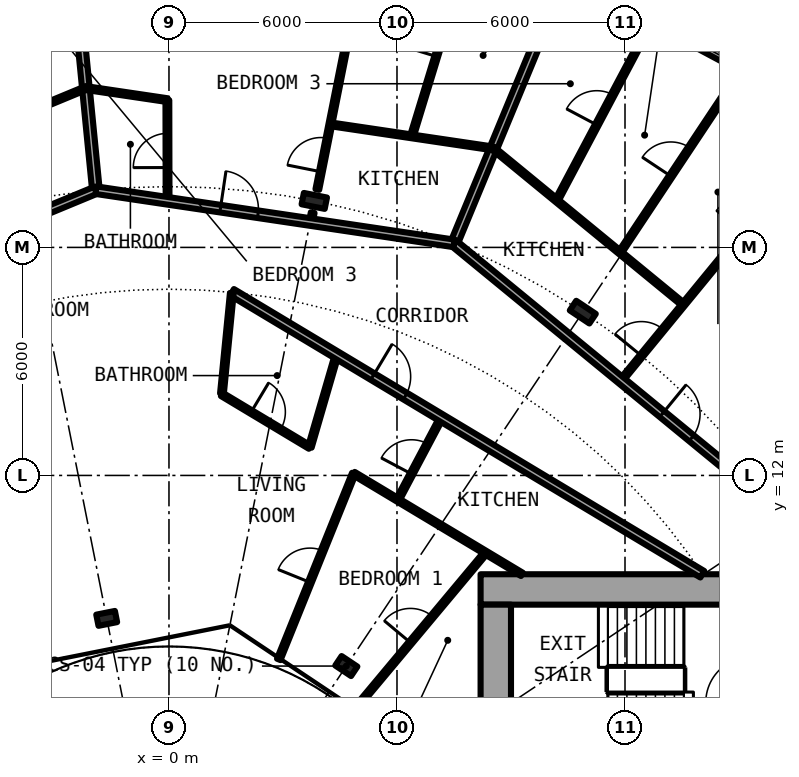
"""IFC4 building model, lengths in metres.
Left out: names, types, materials, properties, quantities, classifications, styles, units other than length and angle.
Written with IfcOpenShell. Run it as: python <this file> out.ifc"""

import sys

from ifc_helpers import new_model, si_unit, direction, frame, frame_2d, origin, origin_2d, place, context, subcontext, project, spatial, rectangle, i_section, extrude, element, fill, save


model = new_model("IFC4")
c1 = context("Model", 3, precision=1e-05, world=origin(), true_north=direction((0.0, 1.0)))
c2 = subcontext(c1, "Body", "Model", "MODEL_VIEW")
j1 = project(units=[si_unit("LENGTHUNIT", "METRE"), si_unit("PLANEANGLEUNIT", "RADIAN")], contexts=[c1])
p1 = place(None, origin())
s1 = spatial("IfcSite", under=j1, at=p1, CompositionType="ELEMENT")
p2 = place(p1, origin())
s2 = spatial("IfcBuilding", under=s1, at=p2, CompositionType="ELEMENT")
p3 = place(p2, frame((0.0, 0.0, 47.2)))
s3 = spatial("IfcBuildingStorey", under=s2, at=p3, CompositionType="ELEMENT", Elevation=47.2)
for number, where, z_axis, x_axis in (
    (1, (10.889, 16.297, 0.0), (0.0, 0.0, 1.0), (0.556, 0.831, 0.0)),
    (2, (3.824, 19.223, 0.0), (0.0, 0.0, 1.0), (0.195, 0.981, 0.0)),
):
    element("IfcColumn", number, at=place(p3, frame(where, z_axis=z_axis, x_axis=x_axis)), inside=s3, PredefinedType="COLUMN", context=c2, shape_type="SweptSolid", body=[
        extrude(i_section(OverallWidth=0.305, OverallDepth=0.62, WebThickness=0.021, FlangeThickness=0.04, FilletRadius=0.027, at=origin_2d()), origin(), (0.0, 0.0, 1.0), 3.05),
    ])
for number, where, z_axis, x_axis in (
    (3, (4.667, 6.984, 0.0), (0.0, 0.0, 1.0), (0.556, 0.831, 0.0)),
    (4, (-1.639, 8.239, 0.0), (0.0, 0.0, 1.0), (-0.195, 0.981, 0.0)),
):
    element("IfcColumn", number, at=place(p3, frame(where, z_axis=z_axis, x_axis=x_axis)), inside=s3, PredefinedType="COLUMN", context=c2, shape_type="SweptSolid", body=[
        extrude(i_section(OverallWidth=0.3, OverallDepth=0.5, WebThickness=0.014, FlangeThickness=0.028, FilletRadius=0.027, at=origin_2d()), origin(), (0.0, 0.0, 1.0), 3.05),
    ])
p4 = place(p3, frame((15.167, 22.699, 0.0), z_axis=(0.0, 0.0, 1.0), x_axis=(-0.881915646801, 0.471407246368, 0.0)))
e5 = element("IfcWall", 5, at=p4, inside=s3, PredefinedType="SOLIDWALL", context=c2, shape_type="SweptSolid", body=[
    extrude(rectangle(XDim=5.352, YDim=0.25, at=frame_2d((2.676, 0.0))), origin(), (0.0, 0.0, 1.0), 2.7),
])
p5 = place(p4, frame((0.441, 0.0, 0.3)))
e6 = element("IfcOpeningElement", 6, at=p5, cuts=e5, PredefinedType="OPENING", context=c2, shape_type="SweptSolid", body=[
    extrude(rectangle(XDim=1.8, YDim=2.1, at=frame_2d((0.9, 1.05))), frame((0.0, 0.135, 0.0), z_axis=(0.0, -1.0, 0.0), x_axis=(1.0, 0.0, 0.0)), (0.0, 0.0, 1.0), 0.27),
])
p6 = place(p4, frame((3.51, 0.0, 0.0)))
e7 = element("IfcOpeningElement", 7, at=p6, cuts=e5, PredefinedType="OPENING", context=c2, shape_type="SweptSolid", body=[
    extrude(rectangle(XDim=1.0, YDim=2.2, at=frame_2d((0.5, 1.1))), frame((0.0, 0.135, 0.0), z_axis=(0.0, -1.0, 0.0), x_axis=(1.0, 0.0, 0.0)), (0.0, 0.0, 1.0), 0.27),
])
p7 = place(p3, frame((22.4, 9.0, 0.0), z_axis=(0.0, 0.0, 1.0), x_axis=(-1.0, 0.0, 0.0)))
e8 = element("IfcWall", 8, at=p7, inside=s3, PredefinedType="SHEAR", context=c2, shape_type="SweptSolid", body=[
    extrude(rectangle(XDim=14.2, YDim=0.8, at=frame_2d((7.1, 0.0))), origin(), (0.0, 0.0, 1.0), 3.05),
])
p8 = place(p7, frame((1.325, 0.0, 0.0)))
e9 = element("IfcOpeningElement", 9, at=p8, cuts=e8, PredefinedType="OPENING", context=c2, shape_type="SweptSolid", body=[
    extrude(rectangle(XDim=1.2, YDim=2.3, at=frame_2d((0.6, 1.15))), frame((0.0, 0.41, 0.0), z_axis=(0.0, -1.0, 0.0), x_axis=(1.0, 0.0, 0.0)), (0.0, 0.0, 1.0), 0.82),
])
p9 = place(p3, frame((8.6, -8.6, 0.0), z_axis=(0.0, 0.0, 1.0), x_axis=(0.0, 1.0, 0.0)))
e10 = element("IfcWall", 10, at=p9, inside=s3, PredefinedType="SHEAR", context=c2, shape_type="SweptSolid", body=[
    extrude(rectangle(XDim=17.2, YDim=0.8, at=frame_2d((8.6, 0.0))), origin(), (0.0, 0.0, 1.0), 3.05),
])
p10 = place(p9, frame((7.4, 0.0, 0.1)))
e11 = element("IfcOpeningElement", 11, at=p10, cuts=e10, PredefinedType="OPENING", context=c2, shape_type="SweptSolid", body=[
    extrude(rectangle(XDim=2.4, YDim=2.2, at=frame_2d((1.2, 1.1))), frame((0.0, 0.41, 0.0), z_axis=(0.0, -1.0, 0.0), x_axis=(1.0, 0.0, 0.0)), (0.0, 0.0, 1.0), 0.82),
])
p11 = place(p3, frame((-2.665, 27.044, 0.0), z_axis=(0.0, 0.0, 1.0), x_axis=(0.098083473227, -0.99517819122, 0.0)))
e12 = element("IfcWall", 12, at=p11, inside=s3, PredefinedType="PARTITIONING", context=c2, shape_type="SweptSolid", body=[
    extrude(rectangle(XDim=7.574, YDim=0.2, at=frame_2d((3.787, 0.0))), origin(), (0.0, 0.0, 1.0), 2.7),
])
p12 = place(p3, frame((-0.037, 19.226, 0.0), z_axis=(0.0, 0.0, 1.0), x_axis=(-0.001843314841, 0.999998301094, 0.0)))
e13 = element("IfcWall", 13, at=p12, inside=s3, PredefinedType="PARTITIONING", context=c2, shape_type="SweptSolid", body=[
    extrude(rectangle(XDim=2.649, YDim=0.1, at=frame_2d((1.324, 0.0))), origin(), (0.0, 0.0, 1.0), 2.7),
])
p13 = place(p12, frame((0.875, 0.0, 0.0)))
e14 = element("IfcOpeningElement", 14, at=p13, cuts=e13, PredefinedType="OPENING", context=c2, shape_type="SweptSolid", body=[
    extrude(rectangle(XDim=0.9, YDim=2.3, at=frame_2d((0.45, 1.15))), frame((0.0, 0.06, 0.0), z_axis=(0.0, -1.0, 0.0), x_axis=(1.0, 0.0, 0.0)), (0.0, 0.0, 1.0), 0.12),
])
p14 = place(p3, frame((2.889, 7.159, 0.0), z_axis=(0.0, 0.0, 1.0), x_axis=(0.374372761824, 0.927278294367, 0.0)))
e15 = element("IfcWall", 15, at=p14, inside=s3, PredefinedType="PARTITIONING", context=c2, shape_type="SweptSolid", body=[
    extrude(rectangle(XDim=5.276, YDim=0.1, at=frame_2d((2.638, 0.0))), origin(), (0.0, 0.0, 1.0), 2.7),
])
p15 = place(p14, frame((2.188, 0.0, 0.0)))
e16 = element("IfcOpeningElement", 16, at=p15, cuts=e15, PredefinedType="OPENING", context=c2, shape_type="SweptSolid", body=[
    extrude(rectangle(XDim=0.9, YDim=2.3, at=frame_2d((0.45, 1.15))), frame((0.0, 0.06, 0.0), z_axis=(0.0, -1.0, 0.0), x_axis=(1.0, 0.0, 0.0)), (0.0, 0.0, 1.0), 0.12),
])
p16 = place(p3, frame((3.706, 12.744, 0.0), z_axis=(0.0, 0.0, 1.0), x_axis=(0.279201466266, 0.960232545395, 0.0)))
e17 = element("IfcWall", 17, at=p16, inside=s3, PredefinedType="PARTITIONING", context=c2, shape_type="SweptSolid", body=[
    extrude(rectangle(XDim=2.524, YDim=0.1, at=frame_2d((1.262, 0.0))), origin(), (0.0, 0.0, 1.0), 2.7),
])
p17 = place(p3, frame((3.733, 18.667, 0.0), z_axis=(0.0, 0.0, 1.0), x_axis=(0.193340656307, 0.981131688724, 0.0)))
e18 = element("IfcWall", 18, at=p17, inside=s3, PredefinedType="PARTITIONING", context=c2, shape_type="SweptSolid", body=[
    extrude(rectangle(XDim=0.254, YDim=0.1, at=frame_2d((0.127, 0.0))), origin(), (0.0, 0.0, 1.0), 2.7),
])
p18 = place(p3, frame((3.904, 19.524, 0.0), z_axis=(0.0, 0.0, 1.0), x_axis=(0.195857618189, 0.980632343642, 0.0)))
e19 = element("IfcWall", 19, at=p18, inside=s3, PredefinedType="PARTITIONING", context=c2, shape_type="SweptSolid", body=[
    extrude(rectangle(XDim=7.265, YDim=0.1, at=frame_2d((3.632, 0.0))), origin(), (0.0, 0.0, 1.0), 2.7),
])
p19 = place(p18, frame((0.476, 0.0, 0.0)))
e20 = element("IfcOpeningElement", 20, at=p19, cuts=e19, PredefinedType="OPENING", context=c2, shape_type="SweptSolid", body=[
    extrude(rectangle(XDim=0.9, YDim=2.3, at=frame_2d((0.45, 1.15))), frame((0.0, 0.06, 0.0), z_axis=(0.0, -1.0, 0.0), x_axis=(1.0, 0.0, 0.0)), (0.0, 0.0, 1.0), 0.12),
])
p20 = place(p18, frame((4.058, 0.0, 0.0)))
e21 = element("IfcOpeningElement", 21, at=p20, cuts=e19, PredefinedType="OPENING", context=c2, shape_type="SweptSolid", body=[
    extrude(rectangle(XDim=0.9, YDim=2.3, at=frame_2d((0.45, 1.15))), frame((0.0, 0.06, 0.0), z_axis=(0.0, -1.0, 0.0), x_axis=(1.0, 0.0, 0.0)), (0.0, 0.0, 1.0), 0.12),
])
p21 = place(p3, frame((4.952, 5.923, 0.0), z_axis=(0.0, 0.0, 1.0), x_axis=(0.641376424834, 0.767226356213, 0.0)))
e22 = element("IfcWall", 22, at=p21, inside=s3, PredefinedType="PARTITIONING", context=c2, shape_type="SweptSolid", body=[
    extrude(rectangle(XDim=5.275, YDim=0.1, at=frame_2d((2.637, 0.0))), origin(), (0.0, 0.0, 1.0), 2.7),
])
p22 = place(p21, frame((2.187, 0.0, 0.0)))
e23 = element("IfcOpeningElement", 23, at=p22, cuts=e22, PredefinedType="OPENING", context=c2, shape_type="SweptSolid", body=[
    extrude(rectangle(XDim=0.9, YDim=2.3, at=frame_2d((0.45, 1.15))), frame((0.0, 0.06, 0.0), z_axis=(0.0, -1.0, 0.0), x_axis=(1.0, 0.0, 0.0)), (0.0, 0.0, 1.0), 0.12),
])
p23 = place(p3, frame((6.021, 11.357, 0.0), z_axis=(0.0, 0.0, 1.0), x_axis=(0.468337293896, 0.883549760425, 0.0)))
e24 = element("IfcWall", 24, at=p23, inside=s3, PredefinedType="PARTITIONING", context=c2, shape_type="SweptSolid", body=[
    extrude(rectangle(XDim=2.445, YDim=0.1, at=frame_2d((1.222, 0.0))), origin(), (0.0, 0.0, 1.0), 2.7),
])
p24 = place(p23, frame((0.772, 0.0, 0.0)))
e25 = element("IfcOpeningElement", 25, at=p24, cuts=e24, PredefinedType="OPENING", context=c2, shape_type="SweptSolid", body=[
    extrude(rectangle(XDim=0.9, YDim=2.3, at=frame_2d((0.45, 1.15))), frame((0.0, 0.06, 0.0), z_axis=(0.0, -1.0, 0.0), x_axis=(1.0, 0.0, 0.0)), (0.0, 0.0, 1.0), 0.12),
])
p25 = place(p3, frame((6.39, 20.921, 0.0), z_axis=(0.0, 0.0, 1.0), x_axis=(0.292081613207, 0.956393397732, 0.0)))
e26 = element("IfcWall", 26, at=p25, inside=s3, PredefinedType="PARTITIONING", context=c2, shape_type="SweptSolid", body=[
    extrude(rectangle(XDim=5.3, YDim=0.1, at=frame_2d((2.65, 0.0))), origin(), (0.0, 0.0, 1.0), 2.7),
])
p26 = place(p25, frame((2.2, 0.0, 0.0)))
e27 = element("IfcOpeningElement", 27, at=p26, cuts=e26, PredefinedType="OPENING", context=c2, shape_type="SweptSolid", body=[
    extrude(rectangle(XDim=0.9, YDim=2.3, at=frame_2d((0.45, 1.15))), frame((0.0, 0.06, 0.0), z_axis=(0.0, -1.0, 0.0), x_axis=(1.0, 0.0, 0.0)), (0.0, 0.0, 1.0), 0.12),
])
p27 = place(p3, frame((7.501, 18.108, 0.0), z_axis=(0.0, 0.0, 1.0), x_axis=(0.382600411313, 0.923913916587, 0.0)))
e28 = element("IfcWall", 28, at=p27, inside=s3, PredefinedType="PARTITIONING", context=c2, shape_type="SweptSolid", body=[
    extrude(rectangle(XDim=7.574, YDim=0.2, at=frame_2d((3.787, 0.0))), origin(), (0.0, 0.0, 1.0), 2.7),
])
p28 = place(p3, frame((10.202, 19.234, 0.0), z_axis=(0.0, 0.0, 1.0), x_axis=(0.468610030042, 0.883405139075, 0.0)))
e29 = element("IfcWall", 29, at=p28, inside=s3, PredefinedType="PARTITIONING", context=c2, shape_type="SweptSolid", body=[
    extrude(rectangle(XDim=5.403, YDim=0.1, at=frame_2d((2.702, 0.0))), origin(), (0.0, 0.0, 1.0), 2.7),
])
p29 = place(p28, frame((2.252, 0.0, 0.0)))
e30 = element("IfcOpeningElement", 30, at=p29, cuts=e29, PredefinedType="OPENING", context=c2, shape_type="SweptSolid", body=[
    extrude(rectangle(XDim=0.9, YDim=2.3, at=frame_2d((0.45, 1.15))), frame((0.0, 0.06, 0.0), z_axis=(0.0, -1.0, 0.0), x_axis=(1.0, 0.0, 0.0)), (0.0, 0.0, 1.0), 0.12),
])
p30 = place(p3, frame((11.87, 17.865, 0.0), z_axis=(0.0, 0.0, 1.0), x_axis=(0.553440102418, 0.832888980018, 0.0)))
e31 = element("IfcWall", 31, at=p30, inside=s3, PredefinedType="PARTITIONING", context=c2, shape_type="SweptSolid", body=[
    extrude(rectangle(XDim=5.726, YDim=0.1, at=frame_2d((2.863, 0.0))), origin(), (0.0, 0.0, 1.0), 2.7),
])
p31 = place(p30, frame((2.413, 0.0, 0.0)))
e32 = element("IfcOpeningElement", 32, at=p31, cuts=e31, PredefinedType="OPENING", context=c2, shape_type="SweptSolid", body=[
    extrude(rectangle(XDim=0.9, YDim=2.3, at=frame_2d((0.45, 1.15))), frame((0.0, 0.06, 0.0), z_axis=(0.0, -1.0, 0.0), x_axis=(1.0, 0.0, 0.0)), (0.0, 0.0, 1.0), 0.12),
])
p32 = place(p3, frame((11.899, 14.499, 0.0), z_axis=(0.0, 0.0, 1.0), x_axis=(0.634396151441, 0.77300810024, 0.0)))
e33 = element("IfcWall", 33, at=p32, inside=s3, PredefinedType="PARTITIONING", context=c2, shape_type="SweptSolid", body=[
    extrude(rectangle(XDim=8.419, YDim=0.1, at=frame_2d((4.209, 0.0))), origin(), (0.0, 0.0, 1.0), 2.7),
])
p33 = place(p32, frame((0.84, 0.0, 0.0)))
e34 = element("IfcOpeningElement", 34, at=p33, cuts=e33, PredefinedType="OPENING", context=c2, shape_type="SweptSolid", body=[
    extrude(rectangle(XDim=0.9, YDim=2.3, at=frame_2d((0.45, 1.15))), frame((0.0, 0.06, 0.0), z_axis=(0.0, -1.0, 0.0), x_axis=(1.0, 0.0, 0.0)), (0.0, 0.0, 1.0), 0.12),
])
p34 = place(p32, frame((5.051, 0.0, 0.0)))
e35 = element("IfcOpeningElement", 35, at=p34, cuts=e33, PredefinedType="OPENING", context=c2, shape_type="SweptSolid", body=[
    extrude(rectangle(XDim=0.9, YDim=2.3, at=frame_2d((0.45, 1.15))), frame((0.0, 0.06, 0.0), z_axis=(0.0, -1.0, 0.0), x_axis=(1.0, 0.0, 0.0)), (0.0, 0.0, 1.0), 0.12),
])
p35 = place(p3, frame((1.392, 14.132, 0.0), z_axis=(0.0, 0.0, 1.0), x_axis=(0.857524856518, -0.514442533674, 0.0)))
e36 = element("IfcWall", 36, at=p35, inside=s3, PredefinedType="PARTITIONING", context=c2, shape_type="SweptSolid", body=[
    extrude(rectangle(XDim=2.698, YDim=0.1, at=frame_2d((1.349, 0.0))), origin(), (0.0, 0.0, 1.0), 2.7),
])
p36 = place(p35, frame((0.899, 0.0, 0.0)))
e37 = element("IfcOpeningElement", 37, at=p36, cuts=e36, PredefinedType="OPENING", context=c2, shape_type="SweptSolid", body=[
    extrude(rectangle(XDim=0.9, YDim=2.3, at=frame_2d((0.45, 1.15))), frame((0.0, 0.06, 0.0), z_axis=(0.0, -1.0, 0.0), x_axis=(1.0, 0.0, 0.0)), (0.0, 0.0, 1.0), 0.12),
])
p37 = place(p3, frame((4.863, 12.05, 0.0), z_axis=(0.0, 0.0, 1.0), x_axis=(0.857576410704, -0.51435658818, 0.0)))
e38 = element("IfcWall", 38, at=p37, inside=s3, PredefinedType="PARTITIONING", context=c2, shape_type="SweptSolid", body=[
    extrude(rectangle(XDim=5.16, YDim=0.1, at=frame_2d((2.58, 0.0))), origin(), (0.0, 0.0, 1.0), 2.7),
])
p38 = place(p3, frame((1.658, 16.819, 0.0), z_axis=(0.0, 0.0, 1.0), x_axis=(0.857688434449, -0.514169767113, 0.0)))
e39 = element("IfcWall", 39, at=p38, inside=s3, PredefinedType="PARTITIONING", context=c2, shape_type="SweptSolid", body=[
    extrude(rectangle(XDim=14.429, YDim=0.2, at=frame_2d((7.215, 0.0))), origin(), (0.0, 0.0, 1.0), 2.7),
])
p39 = place(p38, frame((4.316, 0.0, 0.0)))
e40 = element("IfcOpeningElement", 40, at=p39, cuts=e39, PredefinedType="OPENING", context=c2, shape_type="SweptSolid", body=[
    extrude(rectangle(XDim=1.0, YDim=2.3, at=frame_2d((0.5, 1.15))), frame((0.0, 0.11, 0.0), z_axis=(0.0, -1.0, 0.0), x_axis=(1.0, 0.0, 0.0)), (0.0, 0.0, 1.0), 0.22),
])
p40 = place(p3, frame((-12.435, 15.15, 0.0), z_axis=(0.0, 0.0, 1.0), x_axis=(0.923845560554, 0.38276543763, 0.0)))
e41 = element("IfcWall", 41, at=p40, inside=s3, PredefinedType="PARTITIONING", context=c2, shape_type="SweptSolid", body=[
    extrude(rectangle(XDim=11.381, YDim=0.2, at=frame_2d((5.69, 0.0))), origin(), (0.0, 0.0, 1.0), 2.7),
])
p41 = place(p40, frame((3.293, 0.0, 0.0)))
e42 = element("IfcOpeningElement", 42, at=p41, cuts=e41, PredefinedType="OPENING", context=c2, shape_type="SweptSolid", body=[
    extrude(rectangle(XDim=1.0, YDim=2.3, at=frame_2d((0.5, 1.15))), frame((0.0, 0.11, 0.0), z_axis=(0.0, -1.0, 0.0), x_axis=(1.0, 0.0, 0.0)), (0.0, 0.0, 1.0), 0.22),
])
p42 = place(p3, frame((7.5, 18.108, 0.0), z_axis=(0.0, 0.0, 1.0), x_axis=(0.773041360816, -0.634355621452, 0.0)))
e43 = element("IfcWall", 43, at=p42, inside=s3, PredefinedType="PARTITIONING", context=c2, shape_type="SweptSolid", body=[
    extrude(rectangle(XDim=11.221, YDim=0.2, at=frame_2d((5.61, 0.0))), origin(), (0.0, 0.0, 1.0), 2.38),
])
p43 = place(p42, frame((7.083, 0.0, 0.0)))
e44 = element("IfcOpeningElement", 44, at=p43, cuts=e43, PredefinedType="OPENING", context=c2, shape_type="SweptSolid", body=[
    extrude(rectangle(XDim=1.0, YDim=2.3, at=frame_2d((0.5, 1.15))), frame((0.0, 0.11, 0.0), z_axis=(0.0, -1.0, 0.0), x_axis=(1.0, 0.0, 0.0)), (0.0, 0.0, 1.0), 0.22),
])
p44 = place(p3, frame((-1.921, 19.506, 0.0), z_axis=(0.0, 0.0, 1.0), x_axis=(0.989134446023, -0.147013767014, 0.0)))
e45 = element("IfcWall", 45, at=p44, inside=s3, PredefinedType="PARTITIONING", context=c2, shape_type="SweptSolid", body=[
    extrude(rectangle(XDim=9.531, YDim=0.2, at=frame_2d((4.765, 0.0))), origin(), (0.0, 0.0, 1.0), 2.38),
])
p45 = place(p44, frame((3.31, 0.0, 0.0)))
e46 = element("IfcOpeningElement", 46, at=p45, cuts=e45, PredefinedType="OPENING", context=c2, shape_type="SweptSolid", body=[
    extrude(rectangle(XDim=1.0, YDim=2.3, at=frame_2d((0.5, 1.15))), frame((0.0, 0.11, 0.0), z_axis=(0.0, -1.0, 0.0), x_axis=(1.0, 0.0, 0.0)), (0.0, 0.0, 1.0), 0.22),
])
p46 = place(p3, frame((-8.166, 19.715, 0.0), z_axis=(0.0, 0.0, 1.0), x_axis=(0.923844914631, 0.382766996632, 0.0)))
e47 = element("IfcWall", 47, at=p46, inside=s3, PredefinedType="PARTITIONING", context=c2, shape_type="SweptSolid", body=[
    extrude(rectangle(XDim=6.474, YDim=0.1, at=frame_2d((3.237, 0.0))), origin(), (0.0, 0.0, 1.0), 2.7),
])
p47 = place(p3, frame((8.534, 20.603, 0.0), z_axis=(0.0, 0.0, 1.0), x_axis=(0.773000340237, -0.634405606843, 0.0)))
e48 = element("IfcWall", 48, at=p47, inside=s3, PredefinedType="PARTITIONING", context=c2, shape_type="SweptSolid", body=[
    extrude(rectangle(XDim=6.474, YDim=0.1, at=frame_2d((3.237, 0.0))), origin(), (0.0, 0.0, 1.0), 2.7),
])
p48 = place(p3, frame((-2.186, 22.193, 0.0), z_axis=(0.0, 0.0, 1.0), x_axis=(0.989171386505, -0.146765009863, 0.0)))
e49 = element("IfcWall", 49, at=p48, inside=s3, PredefinedType="PARTITIONING", context=c2, shape_type="SweptSolid", body=[
    extrude(rectangle(XDim=2.167, YDim=0.1, at=frame_2d((1.084, 0.0))), origin(), (0.0, 0.0, 1.0), 2.7),
])
p49 = place(p3, frame((4.246, 21.239, 0.0), z_axis=(0.0, 0.0, 1.0), x_axis=(0.989178348771, -0.146718077695, 0.0)))
e50 = element("IfcWall", 50, at=p49, inside=s3, PredefinedType="PARTITIONING", context=c2, shape_type="SweptSolid", body=[
    extrude(rectangle(XDim=4.335, YDim=0.1, at=frame_2d((2.167, 0.0))), origin(), (0.0, 0.0, 1.0), 2.7),
])
p50 = place(p3, frame((1.394, 14.154, 0.0), z_axis=(0.0, 0.0, 1.0), x_axis=(0.097901702875, 0.995196089509, 0.0)))
e51 = element("IfcWall", 51, at=p50, inside=s3, PredefinedType="PARTITIONING", context=c2, shape_type="SweptSolid", body=[
    extrude(rectangle(XDim=2.656, YDim=0.1, at=frame_2d((1.328, 0.0))), origin(), (0.0, 0.0, 1.0), 2.7),
])
p51 = place(p5, origin())
e52 = element("IfcWindow", 52, at=p51, inside=s3, PartitioningType="SINGLE_PANEL", PredefinedType="WINDOW", context=c2, shape_type="SweptSolid", body=[
    extrude(rectangle(XDim=1.8, YDim=2.1, at=frame_2d((0.9, 1.05))), frame((0.0, 0.03, 0.0), z_axis=(0.0, -1.0, 0.0), x_axis=(1.0, 0.0, 0.0)), (0.0, 0.0, 1.0), 0.06),
])
fill(e6, e52)
p52 = place(p43, origin())
e53 = element("IfcDoor", 53, at=p52, inside=s3, OperationType="SINGLE_SWING_RIGHT", PredefinedType="DOOR", context=c2, shape_type="SweptSolid", body=[
    extrude(rectangle(XDim=1.0, YDim=2.3, at=frame_2d((0.5, 1.15))), frame((0.0, 0.025, 0.0), z_axis=(0.0, -1.0, 0.0), x_axis=(1.0, 0.0, 0.0)), (0.0, 0.0, 1.0), 0.05),
])
fill(e44, e53)
p53 = place(p33, origin())
e54 = element("IfcDoor", 54, at=p53, inside=s3, OperationType="SINGLE_SWING_LEFT", PredefinedType="DOOR", context=c2, shape_type="SweptSolid", body=[
    extrude(rectangle(XDim=0.9, YDim=2.3, at=frame_2d((0.45, 1.15))), frame((0.0, 0.025, 0.0), z_axis=(0.0, -1.0, 0.0), x_axis=(1.0, 0.0, 0.0)), (0.0, 0.0, 1.0), 0.05),
])
fill(e34, e54)
p54 = place(p31, origin())
e55 = element("IfcDoor", 55, at=p54, inside=s3, OperationType="SINGLE_SWING_LEFT", PredefinedType="DOOR", context=c2, shape_type="SweptSolid", body=[
    extrude(rectangle(XDim=0.9, YDim=2.3, at=frame_2d((0.45, 1.15))), frame((0.0, 0.025, 0.0), z_axis=(0.0, -1.0, 0.0), x_axis=(1.0, 0.0, 0.0)), (0.0, 0.0, 1.0), 0.05),
])
fill(e32, e55)
p55 = place(p29, origin())
e56 = element("IfcDoor", 56, at=p55, inside=s3, OperationType="SINGLE_SWING_LEFT", PredefinedType="DOOR", context=c2, shape_type="SweptSolid", body=[
    extrude(rectangle(XDim=0.9, YDim=2.3, at=frame_2d((0.45, 1.15))), frame((0.0, 0.025, 0.0), z_axis=(0.0, -1.0, 0.0), x_axis=(1.0, 0.0, 0.0)), (0.0, 0.0, 1.0), 0.05),
])
fill(e30, e56)
p56 = place(p45, origin())
e57 = element("IfcDoor", 57, at=p56, inside=s3, OperationType="SINGLE_SWING_LEFT", PredefinedType="DOOR", context=c2, shape_type="SweptSolid", body=[
    extrude(rectangle(XDim=1.0, YDim=2.3, at=frame_2d((0.5, 1.15))), frame((0.0, 0.025, 0.0), z_axis=(0.0, -1.0, 0.0), x_axis=(1.0, 0.0, 0.0)), (0.0, 0.0, 1.0), 0.05),
])
fill(e46, e57)
p57 = place(p13, origin())
e58 = element("IfcDoor", 58, at=p57, inside=s3, OperationType="SINGLE_SWING_RIGHT", PredefinedType="DOOR", context=c2, shape_type="SweptSolid", body=[
    extrude(rectangle(XDim=0.9, YDim=2.3, at=frame_2d((0.45, 1.15))), frame((0.0, 0.025, 0.0), z_axis=(0.0, -1.0, 0.0), x_axis=(1.0, 0.0, 0.0)), (0.0, 0.0, 1.0), 0.05),
])
fill(e14, e58)
p58 = place(p19, origin())
e59 = element("IfcDoor", 59, at=p58, inside=s3, OperationType="SINGLE_SWING_LEFT", PredefinedType="DOOR", context=c2, shape_type="SweptSolid", body=[
    extrude(rectangle(XDim=0.9, YDim=2.3, at=frame_2d((0.45, 1.15))), frame((0.0, 0.025, 0.0), z_axis=(0.0, -1.0, 0.0), x_axis=(1.0, 0.0, 0.0)), (0.0, 0.0, 1.0), 0.05),
])
fill(e20, e59)
p59 = place(p26, origin())
e60 = element("IfcDoor", 60, at=p59, inside=s3, OperationType="SINGLE_SWING_LEFT", PredefinedType="DOOR", context=c2, shape_type="SweptSolid", body=[
    extrude(rectangle(XDim=0.9, YDim=2.3, at=frame_2d((0.45, 1.15))), frame((0.0, 0.025, 0.0), z_axis=(0.0, -1.0, 0.0), x_axis=(1.0, 0.0, 0.0)), (0.0, 0.0, 1.0), 0.05),
])
fill(e27, e60)
p60 = place(p39, origin())
e61 = element("IfcDoor", 61, at=p60, inside=s3, OperationType="SINGLE_SWING_LEFT", PredefinedType="DOOR", context=c2, shape_type="SweptSolid", body=[
    extrude(rectangle(XDim=1.0, YDim=2.3, at=frame_2d((0.5, 1.15))), frame((0.0, 0.025, 0.0), z_axis=(0.0, -1.0, 0.0), x_axis=(1.0, 0.0, 0.0)), (0.0, 0.0, 1.0), 0.05),
])
fill(e40, e61)
p61 = place(p36, origin())
e62 = element("IfcDoor", 62, at=p61, inside=s3, OperationType="SINGLE_SWING_RIGHT", PredefinedType="DOOR", context=c2, shape_type="SweptSolid", body=[
    extrude(rectangle(XDim=0.9, YDim=2.3, at=frame_2d((0.45, 1.15))), frame((0.0, 0.025, 0.0), z_axis=(0.0, -1.0, 0.0), x_axis=(1.0, 0.0, 0.0)), (0.0, 0.0, 1.0), 0.05),
])
fill(e37, e62)
p62 = place(p24, origin())
e63 = element("IfcDoor", 63, at=p62, inside=s3, OperationType="SINGLE_SWING_RIGHT", PredefinedType="DOOR", context=c2, shape_type="SweptSolid", body=[
    extrude(rectangle(XDim=0.9, YDim=2.3, at=frame_2d((0.45, 1.15))), frame((0.0, 0.025, 0.0), z_axis=(0.0, -1.0, 0.0), x_axis=(1.0, 0.0, 0.0)), (0.0, 0.0, 1.0), 0.05),
])
fill(e25, e63)
p63 = place(p15, origin())
e64 = element("IfcDoor", 64, at=p63, inside=s3, OperationType="SINGLE_SWING_RIGHT", PredefinedType="DOOR", context=c2, shape_type="SweptSolid", body=[
    extrude(rectangle(XDim=0.9, YDim=2.3, at=frame_2d((0.45, 1.15))), frame((0.0, 0.025, 0.0), z_axis=(0.0, -1.0, 0.0), x_axis=(1.0, 0.0, 0.0)), (0.0, 0.0, 1.0), 0.05),
])
fill(e16, e64)
p64 = place(p22, origin())
e65 = element("IfcDoor", 65, at=p64, inside=s3, OperationType="SINGLE_SWING_RIGHT", PredefinedType="DOOR", context=c2, shape_type="SweptSolid", body=[
    extrude(rectangle(XDim=0.9, YDim=2.3, at=frame_2d((0.45, 1.15))), frame((0.0, 0.025, 0.0), z_axis=(0.0, -1.0, 0.0), x_axis=(1.0, 0.0, 0.0)), (0.0, 0.0, 1.0), 0.05),
])
fill(e23, e65)
save(model, sys.argv[1])
